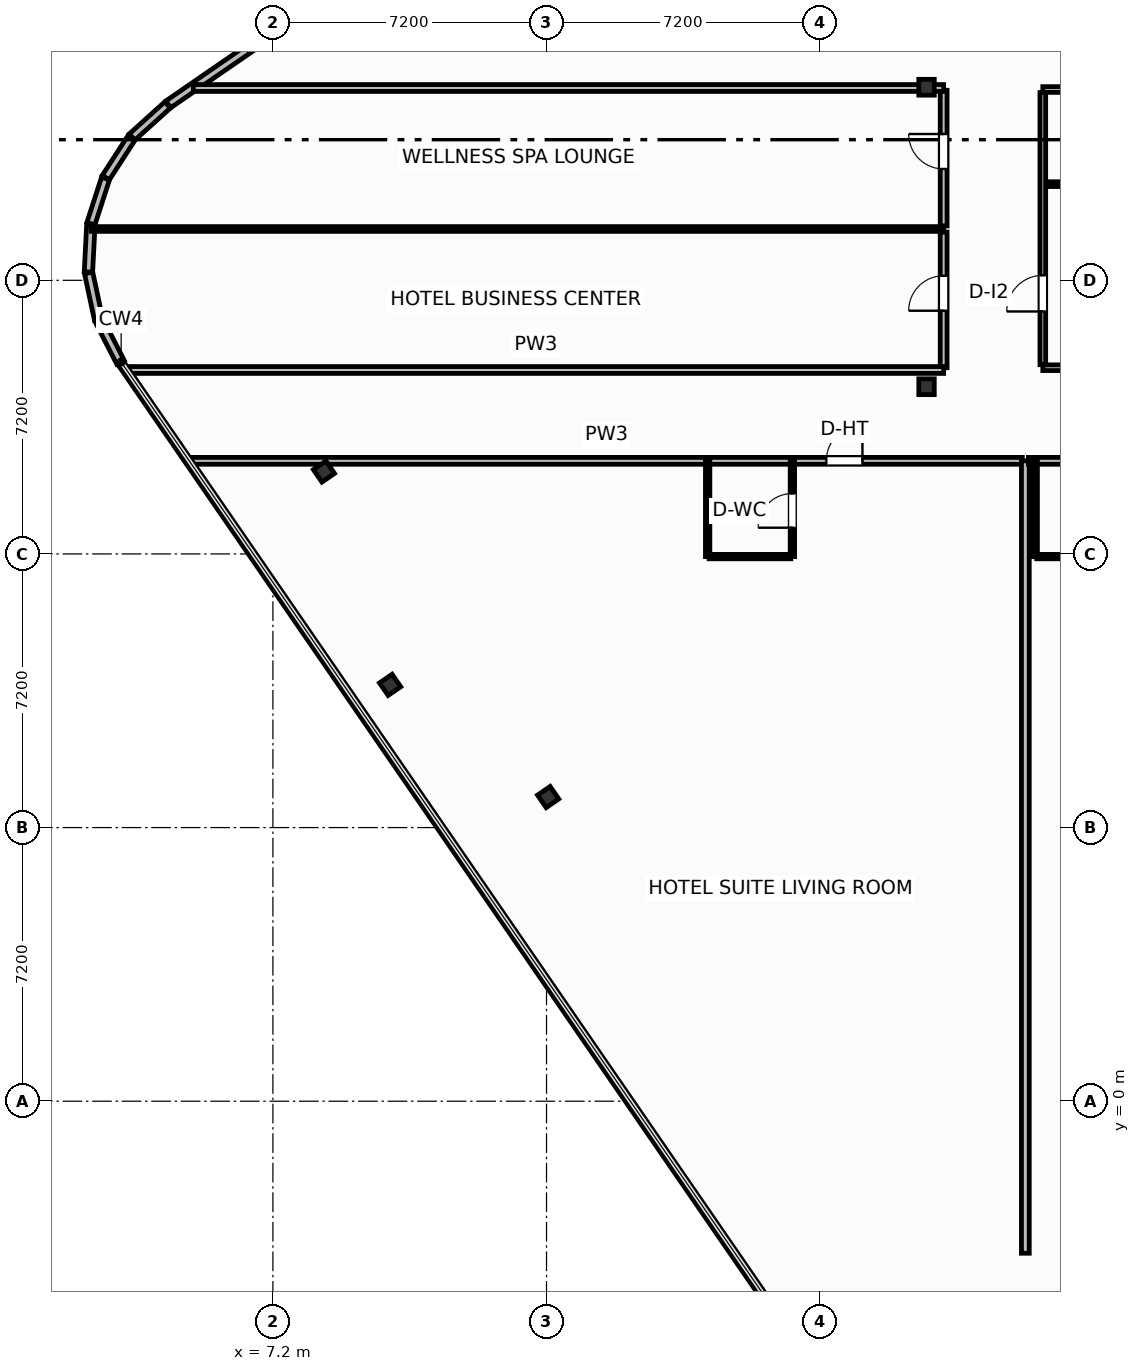
"""IFC4 building model, lengths in metres.
Left out: names, types, materials, properties, quantities, classifications, styles, units other than length and angle.
Written with IfcOpenShell. Run it as: python <this file> out.ifc"""

import sys

from ifc_helpers import new_model, si_unit, direction, frame, frame_2d, origin, origin_2d, place, context, subcontext, project, spatial, rectangle, i_section, extrude, element, fill, save


model = new_model("IFC4")
c1 = context("Model", 3, precision=1e-05, world=origin(), true_north=direction((0.0, 1.0)))
c2 = subcontext(c1, "Body", "Model", "MODEL_VIEW")
j1 = project(units=[si_unit("LENGTHUNIT", "METRE"), si_unit("PLANEANGLEUNIT", "RADIAN")], contexts=[c1])
p1 = place(None, origin())
s1 = spatial("IfcSite", under=j1, at=p1, CompositionType="ELEMENT")
p2 = place(p1, origin())
s2 = spatial("IfcBuilding", under=s1, at=p2, CompositionType="ELEMENT")
p3 = place(p2, frame((0.0, 0.0, 276.7)))
s3 = spatial("IfcBuildingStorey", under=s2, at=p3, CompositionType="ELEMENT", Elevation=276.7)
for number, where, z_axis, x_axis in (
    (1, (24.4, 18.8, 0.0), (0.0, 0.0, 1.0), (1.0, 0.0, 0.0)),
    (2, (24.4, 26.68, 0.0), (0.0, 0.0, 1.0), (1.0, 0.0, 0.0)),
):
    element("IfcColumn", number, at=place(p3, frame(where, z_axis=z_axis, x_axis=x_axis)), inside=s3, PredefinedType="COLUMN", context=c2, shape_type="SweptSolid", body=[
        extrude(i_section(OverallWidth=0.406, OverallDepth=0.416, WebThickness=0.03, FlangeThickness=0.048, FilletRadius=0.025, at=origin_2d()), origin(), (0.0, 0.0, 1.0), 3.7),
    ])
for number, where, z_axis, x_axis in (
    (3, (8.543, 16.569, 0.0), (0.0, 0.0, 1.0), (0.824, 0.567, 0.0)),
    (4, (10.284, 10.956, 0.0), (0.0, 0.0, 1.0), (0.824, 0.567, 0.0)),
    (5, (14.443, 8.004, 0.0), (0.0, 0.0, 1.0), (0.824, 0.567, 0.0)),
):
    element("IfcColumn", number, at=place(p3, frame(where, z_axis=z_axis, x_axis=x_axis)), inside=s3, PredefinedType="COLUMN", context=c2, shape_type="SweptSolid", body=[
        extrude(i_section(OverallWidth=0.401, OverallDepth=0.399, WebThickness=0.025, FlangeThickness=0.04, FilletRadius=0.022, at=origin_2d()), origin(), (0.0, 0.0, 1.0), 3.7),
    ])
p4 = place(p3, frame((27.704, -7.488, 0.0), z_axis=(0.0, 0.0, 1.0), x_axis=(0.823529068157, 0.567274073003, 0.0)))
e6 = element("IfcWall", 6, at=p4, inside=s3, PredefinedType="SOLIDWALL", context=c2, shape_type="SweptSolid", body=[
    extrude(rectangle(XDim=10.98, YDim=0.22, at=frame_2d((5.49, 0.0))), origin(), (0.0, 0.0, 1.0), 2.73),
])
p5 = place(p4, frame((4.44, 0.0, 0.8)))
e7 = element("IfcOpeningElement", 7, at=p5, cuts=e6, PredefinedType="OPENING", context=c2, shape_type="SweptSolid", body=[
    extrude(rectangle(XDim=2.1, YDim=1.75, at=frame_2d((1.05, 0.875))), frame((0.0, 0.12, 0.0), z_axis=(0.0, -1.0, 0.0), x_axis=(1.0, 0.0, 0.0)), (0.0, 0.0, 1.0), 0.24),
])
p6 = place(p3, frame((13.408, 32.402, 0.0), z_axis=(0.0, 0.0, 1.0), x_axis=(-0.823527634633, -0.567276154087, 0.0)))
e8 = element("IfcWall", 8, at=p6, inside=s3, PredefinedType="SOLIDWALL", context=c2, shape_type="SweptSolid", body=[
    extrude(rectangle(XDim=10.88, YDim=0.22, at=frame_2d((5.44, 0.0))), origin(), (0.0, 0.0, 1.0), 2.73),
])
p7 = place(p6, frame((4.39, 0.0, 0.8)))
e9 = element("IfcOpeningElement", 9, at=p7, cuts=e8, PredefinedType="OPENING", context=c2, shape_type="SweptSolid", body=[
    extrude(rectangle(XDim=2.1, YDim=1.75, at=frame_2d((1.05, 0.875))), frame((0.0, 0.12, 0.0), z_axis=(0.0, -1.0, 0.0), x_axis=(1.0, 0.0, 0.0)), (0.0, 0.0, 1.0), 0.24),
])
p8 = place(p3, frame((4.429, 26.213, 0.0), z_axis=(0.0, 0.0, 1.0), x_axis=(-0.742414330744, -0.669941013453, 0.0)))
e10 = element("IfcWall", 10, at=p8, inside=s3, PredefinedType="SOLIDWALL", context=c2, shape_type="SweptSolid", body=[
    extrude(rectangle(XDim=1.257, YDim=0.22, at=frame_2d((0.628, 0.0))), origin(), (0.0, 0.0, 1.0), 2.73),
])
for number, where, z_axis, x_axis in (
    (11, (3.482, 25.351, 0.0), (0.0, 0.0, 1.0), (-0.544, -0.839, 0.0)),
    (12, (2.796, 24.279, 0.0), (0.0, 0.0, 1.0), (-0.308, -0.951, 0.0)),
    (13, (2.41, 23.066, 0.0), (0.0, 0.0, 1.0), (-0.051, -0.999, 0.0)),
):
    element("IfcWall", number, at=place(p3, frame(where, z_axis=z_axis, x_axis=x_axis)), inside=s3, PredefinedType="SOLIDWALL", context=c2, shape_type="SweptSolid", body=[
        extrude(rectangle(XDim=1.249, YDim=0.22, at=frame_2d((0.624, 0.0))), origin(), (0.0, 0.0, 1.0), 2.73),
    ])
for number, where, z_axis, x_axis in (
    (14, (2.351, 21.795, 0.0), (0.0, 0.0, 1.0), (0.209, -0.978, 0.0)),
    (15, (2.623, 20.551, 0.0), (0.0, 0.0, 1.0), (0.455, -0.891, 0.0)),
):
    element("IfcWall", number, at=place(p3, frame(where, z_axis=z_axis, x_axis=x_axis)), inside=s3, PredefinedType="SOLIDWALL", context=c2, shape_type="SweptSolid", body=[
        extrude(rectangle(XDim=1.249, YDim=0.22, at=frame_2d((0.625, 0.0))), origin(), (0.0, 0.0, 1.0), 2.73),
    ])
p9 = place(p3, frame((5.038, 16.85, 0.0), z_axis=(0.0, 0.0, 1.0), x_axis=(1.0, 0.0, 0.0)))
e16 = element("IfcWall", 16, at=p9, inside=s3, PredefinedType="PARTITIONING", context=c2, shape_type="SweptSolid", body=[
    extrude(rectangle(XDim=21.882, YDim=0.18, at=frame_2d((10.941, 0.0))), origin(), (0.0, 0.0, 1.0), 2.739),
])
p10 = place(p9, frame((16.725, 0.0, 0.0)))
e17 = element("IfcOpeningElement", 17, at=p10, cuts=e16, PredefinedType="OPENING", context=c2, shape_type="SweptSolid", body=[
    extrude(rectangle(XDim=0.95, YDim=2.15, at=frame_2d((0.475, 1.075))), frame((0.0, 0.1, 0.0), z_axis=(0.0, -1.0, 0.0), x_axis=(1.0, 0.0, 0.0)), (0.0, 0.0, 1.0), 0.2),
])
p11 = place(p3, frame((18.68, 14.33, 0.0), z_axis=(0.0, 0.0, 1.0), x_axis=(1.0, 0.0, 0.0)))
e18 = element("IfcWall", 18, at=p11, inside=s3, PredefinedType="PARTITIONING", context=c2, shape_type="SweptSolid", body=[
    extrude(rectangle(XDim=2.15, YDim=0.115, at=frame_2d((1.075, 0.0))), origin(), (0.0, 0.0, 1.0), 3.45),
])
p12 = place(p3, frame((20.87, 14.33, 0.0), z_axis=(0.0, 0.0, 1.0), x_axis=(0.0, 1.0, 0.0)))
e19 = element("IfcWall", 19, at=p12, inside=s3, PredefinedType="PARTITIONING", context=c2, shape_type="SweptSolid", body=[
    extrude(rectangle(XDim=2.52, YDim=0.115, at=frame_2d((1.26, 0.0))), origin(), (0.0, 0.0, 1.0), 3.45),
])
p13 = place(p12, frame((0.76, 0.0, 0.0)))
e20 = element("IfcOpeningElement", 20, at=p13, cuts=e19, PredefinedType="OPENING", context=c2, shape_type="SweptSolid", body=[
    extrude(rectangle(XDim=0.9, YDim=2.05, at=frame_2d((0.45, 1.025))), frame((0.0, 0.067, 0.0), z_axis=(0.0, -1.0, 0.0), x_axis=(1.0, 0.0, 0.0)), (0.0, 0.0, 1.0), 0.135),
])
p14 = place(p3, frame((18.64, 14.33, 0.0), z_axis=(0.0, 0.0, 1.0), x_axis=(0.0, 1.0, 0.0)))
e21 = element("IfcWall", 21, at=p14, inside=s3, PredefinedType="PARTITIONING", context=c2, shape_type="SweptSolid", body=[
    extrude(rectangle(XDim=2.52, YDim=0.115, at=frame_2d((1.26, 0.0))), origin(), (0.0, 0.0, 1.0), 3.45),
])
p15 = place(p3, frame((27.0, -4.0, 0.0), z_axis=(0.0, 0.0, 1.0), x_axis=(0.0, 1.0, 0.0)))
e22 = element("IfcWall", 22, at=p15, inside=s3, PredefinedType="PARTITIONING", context=c2, shape_type="SweptSolid", body=[
    extrude(rectangle(XDim=20.85, YDim=0.205, at=frame_2d((10.425, 0.0))), origin(), (0.0, 0.0, 1.0), 3.45),
])
p16 = place(p3, frame((27.08, 16.85, 0.0), z_axis=(0.0, 0.0, 1.0), x_axis=(1.0, 0.0, 0.0)))
e23 = element("IfcWall", 23, at=p16, inside=s3, PredefinedType="PARTITIONING", context=c2, shape_type="SweptSolid", body=[
    extrude(rectangle(XDim=12.04, YDim=0.18, at=frame_2d((6.02, 0.0))), origin(), (0.0, 0.0, 1.0), 3.45),
])
p17 = place(p16, frame((3.328, 0.0, 0.0)))
e24 = element("IfcOpeningElement", 24, at=p17, cuts=e23, PredefinedType="OPENING", context=c2, shape_type="SweptSolid", body=[
    extrude(rectangle(XDim=0.95, YDim=2.15, at=frame_2d((0.475, 1.075))), frame((0.0, 0.1, 0.0), z_axis=(0.0, -1.0, 0.0), x_axis=(1.0, 0.0, 0.0)), (0.0, 0.0, 1.0), 0.2),
])
p18 = place(p3, frame((27.3, 14.33, 0.0), z_axis=(0.0, 0.0, 1.0), x_axis=(1.0, 0.0, 0.0)))
e25 = element("IfcWall", 25, at=p18, inside=s3, PredefinedType="PARTITIONING", context=c2, shape_type="SweptSolid", body=[
    extrude(rectangle(XDim=2.15, YDim=0.115, at=frame_2d((1.075, 0.0))), origin(), (0.0, 0.0, 1.0), 3.45),
])
p19 = place(p3, frame((27.26, 14.33, 0.0), z_axis=(0.0, 0.0, 1.0), x_axis=(0.0, 1.0, 0.0)))
e26 = element("IfcWall", 26, at=p19, inside=s3, PredefinedType="PARTITIONING", context=c2, shape_type="SweptSolid", body=[
    extrude(rectangle(XDim=2.52, YDim=0.115, at=frame_2d((1.26, 0.0))), origin(), (0.0, 0.0, 1.0), 3.45),
])
p20 = place(p3, frame((24.85, 19.3, 0.0), z_axis=(0.0, 0.0, 1.0), x_axis=(0.0, 1.0, 0.0)))
e27 = element("IfcWall", 27, at=p20, inside=s3, PredefinedType="PARTITIONING", context=c2, shape_type="SweptSolid", body=[
    extrude(rectangle(XDim=3.57, YDim=0.18, at=frame_2d((1.785, 0.0))), origin(), (0.0, 0.0, 1.0), 3.45),
])
p21 = place(p20, frame((1.5, 0.0, 0.0)))
e28 = element("IfcOpeningElement", 28, at=p21, cuts=e27, PredefinedType="OPENING", context=c2, shape_type="SweptSolid", body=[
    extrude(rectangle(XDim=0.92, YDim=2.05, at=frame_2d((0.46, 1.025))), frame((0.0, 0.1, 0.0), z_axis=(0.0, -1.0, 0.0), x_axis=(1.0, 0.0, 0.0)), (0.0, 0.0, 1.0), 0.2),
])
p22 = place(p3, frame((24.85, 23.03, 0.0), z_axis=(0.0, 0.0, 1.0), x_axis=(0.0, 1.0, 0.0)))
e29 = element("IfcWall", 29, at=p22, inside=s3, PredefinedType="PARTITIONING", context=c2, shape_type="SweptSolid", body=[
    extrude(rectangle(XDim=3.57, YDim=0.18, at=frame_2d((1.785, 0.0))), origin(), (0.0, 0.0, 1.0), 3.45),
])
p23 = place(p22, frame((1.5, 0.0, 0.0)))
e30 = element("IfcOpeningElement", 30, at=p23, cuts=e29, PredefinedType="OPENING", context=c2, shape_type="SweptSolid", body=[
    extrude(rectangle(XDim=0.92, YDim=2.05, at=frame_2d((0.46, 1.025))), frame((0.0, 0.1, 0.0), z_axis=(0.0, -1.0, 0.0), x_axis=(1.0, 0.0, 0.0)), (0.0, 0.0, 1.0), 0.2),
])
p24 = place(p3, frame((2.424, 22.95, 0.0), z_axis=(0.0, 0.0, 1.0), x_axis=(1.0, 0.0, 0.0)))
e31 = element("IfcWall", 31, at=p24, inside=s3, PredefinedType="PARTITIONING", context=c2, shape_type="SweptSolid", body=[
    extrude(rectangle(XDim=22.426, YDim=0.125, at=frame_2d((11.213, 0.0))), origin(), (0.0, 0.0, 1.0), 3.45),
])
p25 = place(p3, frame((3.392, 19.24, 0.0), z_axis=(0.0, 0.0, 1.0), x_axis=(1.0, 0.0, 0.0)))
e32 = element("IfcWall", 32, at=p25, inside=s3, PredefinedType="PARTITIONING", context=c2, shape_type="SweptSolid", body=[
    extrude(rectangle(XDim=21.458, YDim=0.18, at=frame_2d((10.729, 0.0))), origin(), (0.0, 0.0, 1.0), 3.45),
])
p26 = place(p3, frame((5.107, 26.66, 0.0), z_axis=(0.0, 0.0, 1.0), x_axis=(1.0, 0.0, 0.0)))
e33 = element("IfcWall", 33, at=p26, inside=s3, PredefinedType="PARTITIONING", context=c2, shape_type="SweptSolid", body=[
    extrude(rectangle(XDim=19.743, YDim=0.18, at=frame_2d((9.872, 0.0))), origin(), (0.0, 0.0, 1.0), 2.662),
])
p27 = place(p3, frame((27.46, 19.3, 0.0), z_axis=(0.0, 0.0, 1.0), x_axis=(1.0, 0.0, 0.0)))
e34 = element("IfcWall", 34, at=p27, inside=s3, PredefinedType="PARTITIONING", context=c2, shape_type="SweptSolid", body=[
    extrude(rectangle(XDim=6.1, YDim=0.15, at=frame_2d((3.05, 0.0))), origin(), (0.0, 0.0, 1.0), 2.662),
])
p28 = place(p3, frame((27.46, 26.62, 0.0), z_axis=(0.0, 0.0, 1.0), x_axis=(1.0, 0.0, 0.0)))
e35 = element("IfcWall", 35, at=p28, inside=s3, PredefinedType="PARTITIONING", context=c2, shape_type="SweptSolid", body=[
    extrude(rectangle(XDim=6.1, YDim=0.15, at=frame_2d((3.05, 0.0))), origin(), (0.0, 0.0, 1.0), 2.662),
])
p29 = place(p28, frame((1.15, 0.0, 0.0)))
e36 = element("IfcOpeningElement", 36, at=p29, cuts=e35, PredefinedType="OPENING", context=c2, shape_type="SweptSolid", body=[
    extrude(rectangle(XDim=0.9, YDim=2.05, at=frame_2d((0.45, 1.025))), frame((0.0, 0.085, 0.0), z_axis=(0.0, -1.0, 0.0), x_axis=(1.0, 0.0, 0.0)), (0.0, 0.0, 1.0), 0.17),
])
p30 = place(p28, frame((4.45, 0.0, 0.0)))
e37 = element("IfcOpeningElement", 37, at=p30, cuts=e35, PredefinedType="OPENING", context=c2, shape_type="SweptSolid", body=[
    extrude(rectangle(XDim=0.92, YDim=2.05, at=frame_2d((0.46, 1.025))), frame((0.0, 0.085, 0.0), z_axis=(0.0, -1.0, 0.0), x_axis=(1.0, 0.0, 0.0)), (0.0, 0.0, 1.0), 0.17),
])
p31 = place(p3, frame((27.52, 24.13, 0.0), z_axis=(0.0, 0.0, 1.0), x_axis=(1.0, 0.0, 0.0)))
e38 = element("IfcWall", 38, at=p31, inside=s3, PredefinedType="PARTITIONING", context=c2, shape_type="SweptSolid", body=[
    extrude(rectangle(XDim=3.7, YDim=0.125, at=frame_2d((1.85, 0.0))), origin(), (0.0, 0.0, 1.0), 3.45),
])
p32 = place(p3, frame((27.46, 19.38, 0.0), z_axis=(0.0, 0.0, 1.0), x_axis=(0.0, 1.0, 0.0)))
e39 = element("IfcWall", 39, at=p32, inside=s3, PredefinedType="PARTITIONING", context=c2, shape_type="SweptSolid", body=[
    extrude(rectangle(XDim=7.16, YDim=0.15, at=frame_2d((3.58, 0.0))), origin(), (0.0, 0.0, 1.0), 3.45),
])
p33 = place(p32, frame((1.4, 0.0, 0.0)))
e40 = element("IfcOpeningElement", 40, at=p33, cuts=e39, PredefinedType="OPENING", context=c2, shape_type="SweptSolid", body=[
    extrude(rectangle(XDim=0.95, YDim=2.05, at=frame_2d((0.475, 1.025))), frame((0.0, 0.085, 0.0), z_axis=(0.0, -1.0, 0.0), x_axis=(1.0, 0.0, 0.0)), (0.0, 0.0, 1.0), 0.17),
])
p34 = place(p10, origin())
e41 = element("IfcDoor", 41, at=p34, inside=s3, OperationType="SINGLE_SWING_RIGHT", PredefinedType="DOOR", context=c2, shape_type="SweptSolid", body=[
    extrude(rectangle(XDim=0.95, YDim=2.15, at=frame_2d((0.475, 1.075))), frame((0.0, 0.025, 0.0), z_axis=(0.0, -1.0, 0.0), x_axis=(1.0, 0.0, 0.0)), (0.0, 0.0, 1.0), 0.05),
])
fill(e17, e41)
p35 = place(p13, origin())
e42 = element("IfcDoor", 42, at=p35, inside=s3, OperationType="SINGLE_SWING_LEFT", PredefinedType="DOOR", context=c2, shape_type="SweptSolid", body=[
    extrude(rectangle(XDim=0.9, YDim=2.05, at=frame_2d((0.45, 1.025))), frame((0.0, 0.025, 0.0), z_axis=(0.0, -1.0, 0.0), x_axis=(1.0, 0.0, 0.0)), (0.0, 0.0, 1.0), 0.05),
])
fill(e20, e42)
p36 = place(p21, origin())
e43 = element("IfcDoor", 43, at=p36, inside=s3, OperationType="SINGLE_SWING_LEFT", PredefinedType="DOOR", context=c2, shape_type="SweptSolid", body=[
    extrude(rectangle(XDim=0.92, YDim=2.05, at=frame_2d((0.46, 1.025))), frame((0.0, 0.025, 0.0), z_axis=(0.0, -1.0, 0.0), x_axis=(1.0, 0.0, 0.0)), (0.0, 0.0, 1.0), 0.05),
])
fill(e28, e43)
p37 = place(p23, origin())
e44 = element("IfcDoor", 44, at=p37, inside=s3, OperationType="SINGLE_SWING_RIGHT", PredefinedType="DOOR", context=c2, shape_type="SweptSolid", body=[
    extrude(rectangle(XDim=0.92, YDim=2.05, at=frame_2d((0.46, 1.025))), frame((0.0, 0.025, 0.0), z_axis=(0.0, -1.0, 0.0), x_axis=(1.0, 0.0, 0.0)), (0.0, 0.0, 1.0), 0.05),
])
fill(e30, e44)
p38 = place(p33, origin())
e45 = element("IfcDoor", 45, at=p38, inside=s3, OperationType="SINGLE_SWING_LEFT", PredefinedType="DOOR", context=c2, shape_type="SweptSolid", body=[
    extrude(rectangle(XDim=0.95, YDim=2.05, at=frame_2d((0.475, 1.025))), frame((0.0, 0.025, 0.0), z_axis=(0.0, -1.0, 0.0), x_axis=(1.0, 0.0, 0.0)), (0.0, 0.0, 1.0), 0.05),
])
fill(e40, e45)
save(model, sys.argv[1])
